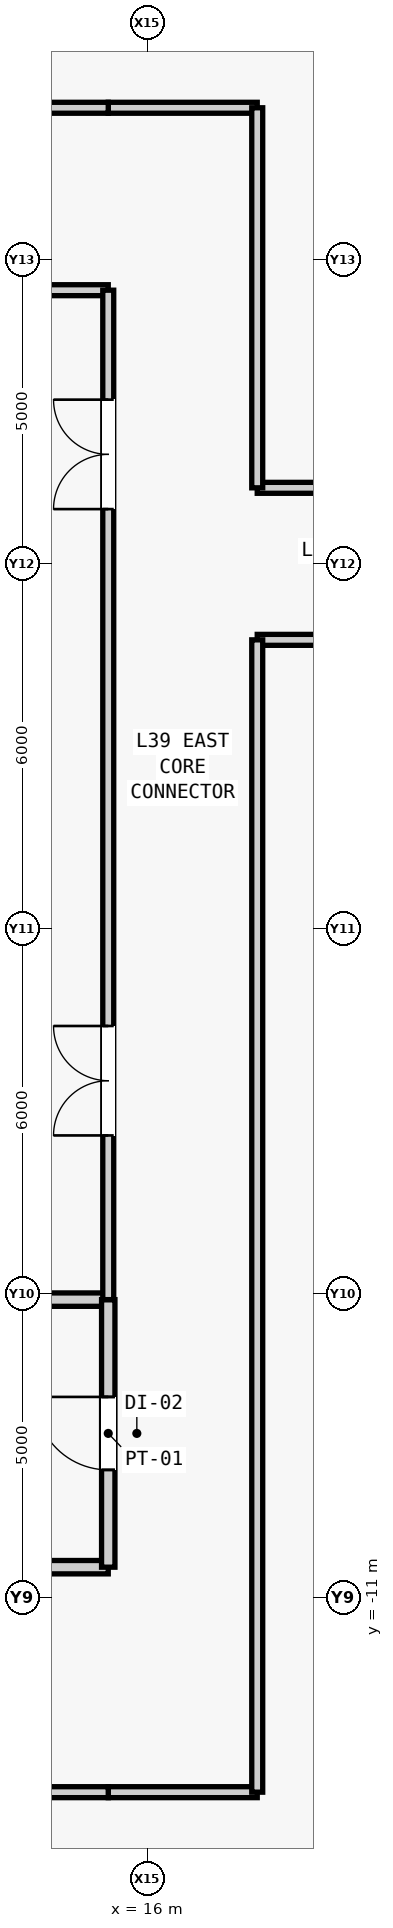
"""IFC4 building model, lengths in metres.
Left out: names, types, materials, properties, quantities, classifications, styles, units other than length and angle.
Written with IfcOpenShell. Run it as: python <this file> out.ifc"""

import sys

from ifc_helpers import new_model, si_unit, direction, frame, frame_2d, origin, place, context, subcontext, project, spatial, rectangle, extrude, source, transform, mapped, element, fill, save


model = new_model("IFC4")
c1 = context("Model", 3, precision=1e-05, world=origin(), true_north=direction((0.0, 1.0)))
c2 = subcontext(c1, "Body", "Model", "MODEL_VIEW")
j1 = project(units=[si_unit("LENGTHUNIT", "METRE"), si_unit("PLANEANGLEUNIT", "RADIAN")], contexts=[c1])
p1 = place(None, origin())
s1 = spatial("IfcSite", under=j1, at=p1, CompositionType="ELEMENT")
p2 = place(p1, origin())
s2 = spatial("IfcBuilding", under=s1, at=p2, CompositionType="ELEMENT")
p3 = place(p2, frame((0.0, 0.0, 171.1)))
s3 = spatial("IfcBuildingStorey", under=s2, at=p3, CompositionType="ELEMENT", Elevation=171.1)
m1 = source(origin(), c2, "Body", "SweptSolid", [
    extrude(rectangle(XDim=4.05, YDim=0.22, at=frame_2d((2.025, 0.0))), origin(), (0.0, 0.0, 1.0), 3.78),
])
p4 = place(p3, frame((11.3, -10.5, 0.0), z_axis=(0.0, 0.0, 1.0), x_axis=(1.0, 0.0, 0.0)))
e1 = element("IfcWall", 1, at=p4, inside=s3, PredefinedType="PARTITIONING", context=c2, shape_type="MappedRepresentation", body=[
    mapped(m1, transform((0.0, 0.0, 0.0), scale=1.0)),
])
m2 = source(origin(), c2, "Body", "SweptSolid", [
    extrude(rectangle(XDim=4.05, YDim=0.22, at=frame_2d((2.025, 0.0))), origin(), (0.0, 0.0, 1.0), 3.007),
])
p5 = place(p3, frame((11.3, -6.1, 0.0), z_axis=(0.0, 0.0, 1.0), x_axis=(1.0, 0.0, 0.0)))
e2 = element("IfcWall", 2, at=p5, inside=s3, PredefinedType="PARTITIONING", context=c2, shape_type="MappedRepresentation", body=[
    mapped(m2, transform((0.0, 0.0, 0.0), scale=1.0)),
])
m3 = source(origin(), c2, "Body", "SweptSolid", [
    extrude(rectangle(XDim=4.4, YDim=0.22, at=frame_2d((2.2, 0.0))), origin(), (0.0, 0.0, 1.0), 3.78),
])
p6 = place(p3, frame((15.35, -10.5, 0.0), z_axis=(0.0, 0.0, 1.0), x_axis=(0.0, 1.0, 0.0)))
e3 = element("IfcWall", 3, at=p6, inside=s3, PredefinedType="PARTITIONING", context=c2, shape_type="MappedRepresentation", body=[
    mapped(m3, transform((0.0, 0.0, 0.0), scale=1.0)),
])
m4 = source(origin(), c2, "Body", "SweptSolid", [
    extrude(rectangle(XDim=1.2, YDim=2.2, at=frame_2d((0.6, 1.1))), frame((0.0, 0.12, 0.0), z_axis=(0.0, -1.0, 0.0), x_axis=(1.0, 0.0, 0.0)), (0.0, 0.0, 1.0), 0.24),
])
p7 = place(p6, frame((1.6, 0.0, 0.0)))
e4 = element("IfcOpeningElement", 4, at=p7, cuts=e3, PredefinedType="OPENING", context=c2, shape_type="MappedRepresentation", body=[
    mapped(m4, transform((0.0, 0.0, 0.0), scale=1.0)),
])
m5 = source(origin(), c2, "Body", "SweptSolid", [
    extrude(rectangle(XDim=4.05, YDim=0.18, at=frame_2d((2.025, 0.0))), origin(), (0.0, 0.0, 1.0), 3.78),
])
p8 = place(p3, frame((11.3, 10.5, 0.0), z_axis=(0.0, 0.0, 1.0), x_axis=(1.0, 0.0, 0.0)))
e5 = element("IfcWall", 5, at=p8, inside=s3, PredefinedType="PARTITIONING", context=c2, shape_type="MappedRepresentation", body=[
    mapped(m5, transform((0.0, 0.0, 0.0), scale=1.0)),
])
m6 = source(origin(), c2, "Body", "SweptSolid", [
    extrude(rectangle(XDim=16.6, YDim=0.18, at=frame_2d((8.3, 0.0))), origin(), (0.0, 0.0, 1.0), 3.78),
])
p9 = place(p3, frame((15.35, -6.1, 0.0), z_axis=(0.0, 0.0, 1.0), x_axis=(0.0, 1.0, 0.0)))
e6 = element("IfcWall", 6, at=p9, inside=s3, PredefinedType="PARTITIONING", context=c2, shape_type="MappedRepresentation", body=[
    mapped(m6, transform((0.0, 0.0, 0.0), scale=1.0)),
])
m7 = source(origin(), c2, "Body", "SweptSolid", [
    extrude(rectangle(XDim=1.8, YDim=2.25, at=frame_2d((0.9, 1.125))), frame((0.0, 0.1, 0.0), z_axis=(0.0, -1.0, 0.0), x_axis=(1.0, 0.0, 0.0)), (0.0, 0.0, 1.0), 0.2),
])
p10 = place(p9, frame((2.7, 0.0, 0.0)))
e7 = element("IfcOpeningElement", 7, at=p10, cuts=e6, PredefinedType="OPENING", context=c2, shape_type="MappedRepresentation", body=[
    mapped(m7, transform((0.0, 0.0, 0.0), scale=1.0)),
])
p11 = place(p9, frame((13.0, 0.0, 0.0)))
e8 = element("IfcOpeningElement", 8, at=p11, cuts=e6, PredefinedType="OPENING", context=c2, shape_type="MappedRepresentation", body=[
    mapped(m7, transform((0.0, 0.0, 0.0), scale=1.0)),
])
m8 = source(origin(), c2, "Body", "SweptSolid", [
    extrude(rectangle(XDim=2.45, YDim=0.18, at=frame_2d((1.225, 0.0))), origin(), (0.0, 0.0, 1.0), 3.78),
])
for number, where, z_axis, x_axis in (
    (9, (15.35, -14.2, 0.0), (0.0, 0.0, 1.0), (1.0, 0.0, 0.0)),
    (10, (15.35, 13.5, 0.0), (0.0, 0.0, 1.0), (1.0, 0.0, 0.0)),
):
    element("IfcWall", number, at=place(p3, frame(where, z_axis=z_axis, x_axis=x_axis)), inside=s3, PredefinedType="PARTITIONING", context=c2, shape_type="MappedRepresentation", body=[
        mapped(m8, transform((0.0, 0.0, 0.0), scale=1.0)),
    ])
m9 = source(origin(), c2, "Body", "SweptSolid", [
    extrude(rectangle(XDim=16.85, YDim=0.18, at=frame_2d((8.425, 0.0))), origin(), (0.0, 0.0, 1.0), 3.78),
])
p12 = place(p3, frame((-1.5, -14.2, 0.0), z_axis=(0.0, 0.0, 1.0), x_axis=(1.0, 0.0, 0.0)))
e11 = element("IfcWall", 11, at=p12, inside=s3, PredefinedType="PARTITIONING", context=c2, shape_type="MappedRepresentation", body=[
    mapped(m9, transform((0.0, 0.0, 0.0), scale=1.0)),
])
m10 = source(origin(), c2, "Body", "SweptSolid", [
    extrude(rectangle(XDim=7.85, YDim=0.18, at=frame_2d((3.925, 0.0))), origin(), (0.0, 0.0, 1.0), 3.78),
])
p13 = place(p3, frame((7.5, 13.5, 0.0), z_axis=(0.0, 0.0, 1.0), x_axis=(1.0, 0.0, 0.0)))
e12 = element("IfcWall", 12, at=p13, inside=s3, PredefinedType="PARTITIONING", context=c2, shape_type="MappedRepresentation", body=[
    mapped(m10, transform((0.0, 0.0, 0.0), scale=1.0)),
])
m11 = source(origin(), c2, "Body", "SweptSolid", [
    extrude(rectangle(XDim=12.2, YDim=0.18, at=frame_2d((6.1, 0.0))), origin(), (0.0, 0.0, 1.0), 3.78),
])
p14 = place(p3, frame((17.8, 4.75, 0.0), z_axis=(0.0, 0.0, 1.0), x_axis=(1.0, 0.0, 0.0)))
e13 = element("IfcWall", 13, at=p14, inside=s3, PredefinedType="PARTITIONING", context=c2, shape_type="MappedRepresentation", body=[
    mapped(m11, transform((0.0, 0.0, 0.0), scale=1.0)),
])
m12 = source(origin(), c2, "Body", "SweptSolid", [
    extrude(rectangle(XDim=0.95, YDim=2.15, at=frame_2d((0.475, 1.075))), frame((0.0, 0.1, 0.0), z_axis=(0.0, -1.0, 0.0), x_axis=(1.0, 0.0, 0.0)), (0.0, 0.0, 1.0), 0.2),
])
p15 = place(p14, frame((5.625, 0.0, 0.0)))
e14 = element("IfcOpeningElement", 14, at=p15, cuts=e13, PredefinedType="OPENING", context=c2, shape_type="MappedRepresentation", body=[
    mapped(m12, transform((0.0, 0.0, 0.0), scale=1.0)),
])
m13 = source(origin(), c2, "Body", "SweptSolid", [
    extrude(rectangle(XDim=18.95, YDim=0.18, at=frame_2d((9.475, 0.0))), origin(), (0.0, 0.0, 1.0), 3.78),
])
p16 = place(p3, frame((17.8, -14.2, 0.0), z_axis=(0.0, 0.0, 1.0), x_axis=(0.0, 1.0, 0.0)))
e15 = element("IfcWall", 15, at=p16, inside=s3, PredefinedType="PARTITIONING", context=c2, shape_type="MappedRepresentation", body=[
    mapped(m13, transform((0.0, 0.0, 0.0), scale=1.0)),
])
p17 = place(p3, frame((17.8, 7.25, 0.0), z_axis=(0.0, 0.0, 1.0), x_axis=(1.0, 0.0, 0.0)))
e16 = element("IfcWall", 16, at=p17, inside=s3, PredefinedType="PARTITIONING", context=c2, shape_type="MappedRepresentation", body=[
    mapped(m11, transform((0.0, 0.0, 0.0), scale=1.0)),
])
p18 = place(p17, frame((5.625, 0.0, 0.0)))
e17 = element("IfcOpeningElement", 17, at=p18, cuts=e16, PredefinedType="OPENING", context=c2, shape_type="MappedRepresentation", body=[
    mapped(m12, transform((0.0, 0.0, 0.0), scale=1.0)),
])
m14 = source(origin(), c2, "Body", "SweptSolid", [
    extrude(rectangle(XDim=6.25, YDim=0.18, at=frame_2d((3.125, 0.0))), origin(), (0.0, 0.0, 1.0), 3.78),
])
p19 = place(p3, frame((17.8, 7.25, 0.0), z_axis=(0.0, 0.0, 1.0), x_axis=(0.0, 1.0, 0.0)))
e18 = element("IfcWall", 18, at=p19, inside=s3, PredefinedType="PARTITIONING", context=c2, shape_type="MappedRepresentation", body=[
    mapped(m14, transform((0.0, 0.0, 0.0), scale=1.0)),
])
m15 = source(origin(), c2, "Body", "SweptSolid", [
    extrude(rectangle(XDim=1.2, YDim=2.2, at=frame_2d((0.6, 1.1))), frame((0.0, 0.025, 0.0), z_axis=(0.0, -1.0, 0.0), x_axis=(1.0, 0.0, 0.0)), (0.0, 0.0, 1.0), 0.05),
])
p20 = place(p7, origin())
e19 = element("IfcDoor", 19, at=p20, inside=s3, OperationType="SINGLE_SWING_RIGHT", PredefinedType="DOOR", context=c2, shape_type="MappedRepresentation", body=[
    mapped(m15, transform((0.0, 0.0, 0.0), scale=1.0)),
])
fill(e4, e19)
m16 = source(origin(), c2, "Body", "SweptSolid", [
    extrude(rectangle(XDim=1.8, YDim=2.25, at=frame_2d((0.9, 1.125))), frame((0.0, 0.025, 0.0), z_axis=(0.0, -1.0, 0.0), x_axis=(1.0, 0.0, 0.0)), (0.0, 0.0, 1.0), 0.05),
])
p21 = place(p10, origin())
e20 = element("IfcDoor", 20, at=p21, inside=s3, OperationType="SINGLE_SWING_RIGHT", PredefinedType="DOOR", context=c2, shape_type="MappedRepresentation", body=[
    mapped(m16, transform((0.0, 0.0, 0.0), scale=1.0)),
])
fill(e7, e20)
p22 = place(p11, origin())
e21 = element("IfcDoor", 21, at=p22, inside=s3, OperationType="SINGLE_SWING_LEFT", PredefinedType="DOOR", context=c2, shape_type="MappedRepresentation", body=[
    mapped(m16, transform((0.0, 0.0, 0.0), scale=1.0)),
])
fill(e8, e21)
save(model, sys.argv[1])
